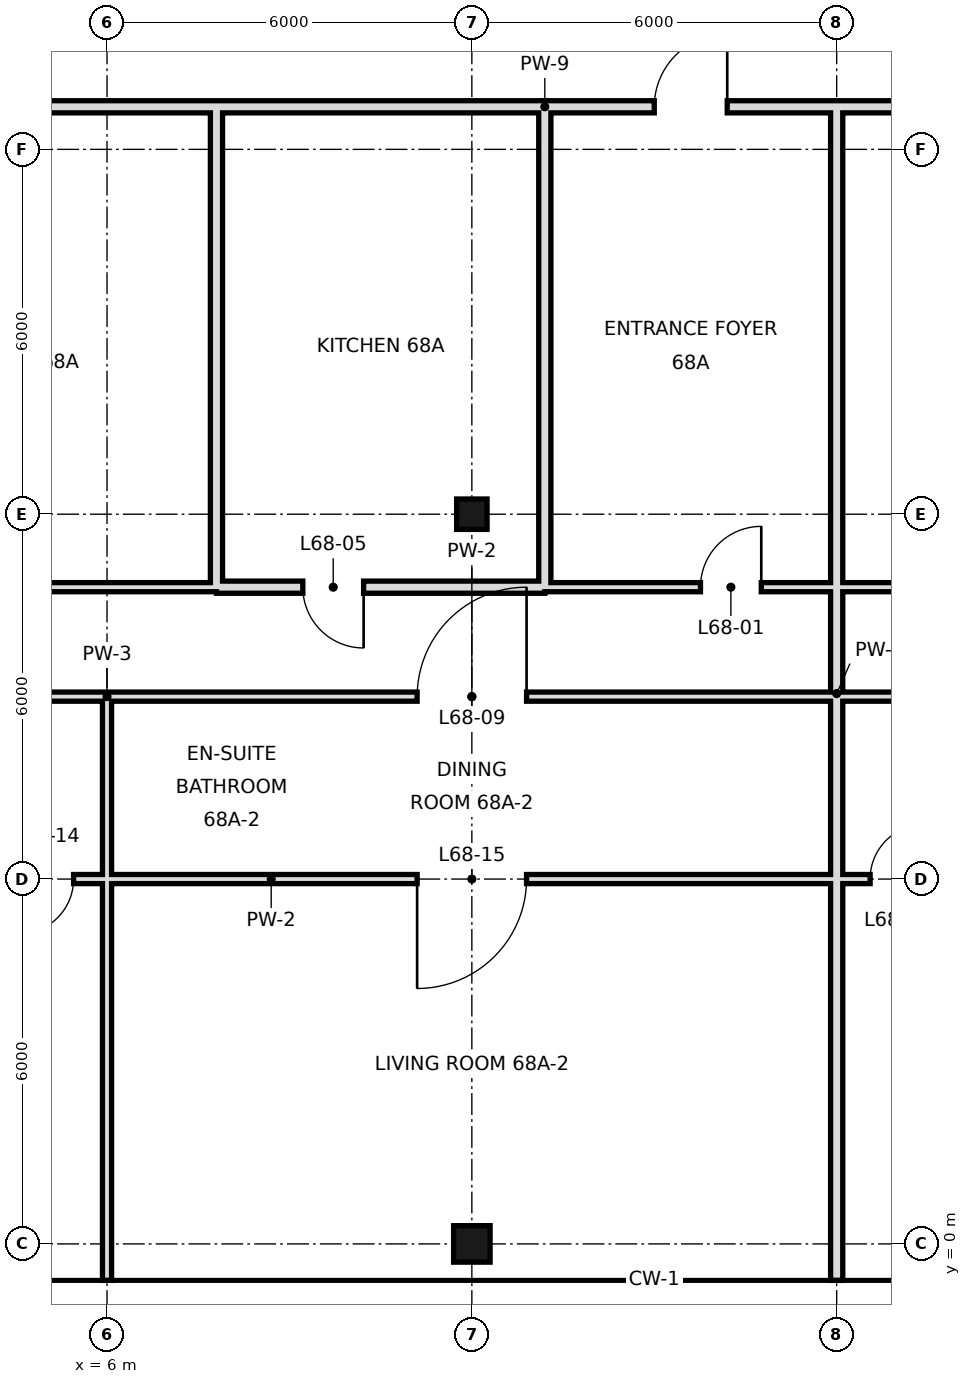
"""IFC4 building model, lengths in metres.
Left out: names, types, materials, properties, quantities, classifications, styles, units other than length and angle.
Written with IfcOpenShell. Run it as: python <this file> out.ifc"""

import sys

from ifc_helpers import new_model, si_unit, direction, frame, frame_2d, origin, origin_2d, place, context, subcontext, project, spatial, rectangle, hollow_rectangle, extrude, element, fill, save


model = new_model("IFC4")
c1 = context("Model", 3, precision=1e-05, world=origin(), true_north=direction((0.0, 1.0)))
c2 = subcontext(c1, "Body", "Model", "MODEL_VIEW")
j1 = project(units=[si_unit("LENGTHUNIT", "METRE"), si_unit("PLANEANGLEUNIT", "RADIAN")], contexts=[c1])
p1 = place(None, origin())
s1 = spatial("IfcSite", under=j1, at=p1, CompositionType="ELEMENT")
p2 = place(p1, origin())
s2 = spatial("IfcBuilding", under=s1, at=p2, CompositionType="ELEMENT")
p3 = place(p2, frame((0.0, 0.0, 290.8)))
s3 = spatial("IfcBuildingStorey", under=s2, at=p3, CompositionType="ELEMENT", Elevation=290.8)
p4 = place(p3, frame((12.0, 0.0, 0.0), z_axis=(0.0, 0.0, 1.0), x_axis=(1.0, 0.0, 0.0)))
e1 = element("IfcColumn", 1, at=p4, inside=s3, PredefinedType="COLUMN", context=c2, shape_type="SweptSolid", body=[
    extrude(hollow_rectangle(XDim=0.6, YDim=0.6, WallThickness=0.028, at=origin_2d()), origin(), (0.0, 0.0, 1.0), 3.6),
])
p5 = place(p3, frame((12.0, 12.0, 0.0), z_axis=(0.0, 0.0, 1.0), x_axis=(1.0, 0.0, 0.0)))
e2 = element("IfcColumn", 2, at=p5, inside=s3, PredefinedType="COLUMN", context=c2, shape_type="SweptSolid", body=[
    extrude(hollow_rectangle(XDim=0.5, YDim=0.5, WallThickness=0.025, at=origin_2d()), origin(), (0.0, 0.0, 1.0), 3.6),
])
p6 = place(p3, frame((13.2, 10.8, 0.0), z_axis=(0.0, 0.0, 1.0), x_axis=(0.0, 1.0, 0.0)))
e3 = element("IfcWall", 3, at=p6, inside=s3, PredefinedType="SOLIDWALL", context=c2, shape_type="SweptSolid", body=[
    extrude(rectangle(XDim=7.9, YDim=0.2, at=frame_2d((3.95, 0.0))), origin(), (0.0, 0.0, 1.0), 2.72),
])
p7 = place(p3, frame((18.0, -0.6, 0.0), z_axis=(0.0, 0.0, 1.0), x_axis=(0.0, 1.0, 0.0)))
e4 = element("IfcWall", 4, at=p7, inside=s3, PredefinedType="SOLIDWALL", context=c2, shape_type="SweptSolid", body=[
    extrude(rectangle(XDim=19.3, YDim=0.2, at=frame_2d((9.65, 0.0))), origin(), (0.0, 0.0, 1.0), 2.72),
])
p8 = place(p3, frame((6.0, -0.6, 0.0), z_axis=(0.0, 0.0, 1.0), x_axis=(0.0, 1.0, 0.0)))
e5 = element("IfcWall", 5, at=p8, inside=s3, PredefinedType="PARTITIONING", context=c2, shape_type="SweptSolid", body=[
    extrude(rectangle(XDim=6.6, YDim=0.15, at=frame_2d((3.3, 0.0))), origin(), (0.0, 0.0, 1.0), 2.72),
])
p9 = place(p3, frame((6.0, 6.0, 0.0), z_axis=(0.0, 0.0, 1.0), x_axis=(0.0, 1.0, 0.0)))
e6 = element("IfcWall", 6, at=p9, inside=s3, PredefinedType="PARTITIONING", context=c2, shape_type="SweptSolid", body=[
    extrude(rectangle(XDim=3.0, YDim=0.15, at=frame_2d((1.5, 0.0))), origin(), (0.0, 0.0, 1.0), 2.72),
])
p10 = place(p3, frame((7.8, 10.8, 0.0), z_axis=(0.0, 0.0, 1.0), x_axis=(0.0, 1.0, 0.0)))
e7 = element("IfcWall", 7, at=p10, inside=s3, PredefinedType="SOLIDWALL", context=c2, shape_type="SweptSolid", body=[
    extrude(rectangle(XDim=7.9, YDim=0.2, at=frame_2d((3.95, 0.0))), origin(), (0.0, 0.0, 1.0), 2.72),
])
p11 = place(p3, frame((7.8, 10.8, 0.0), z_axis=(0.0, 0.0, 1.0), x_axis=(1.0, 0.0, 0.0)))
e8 = element("IfcWall", 8, at=p11, inside=s3, PredefinedType="SOLIDWALL", context=c2, shape_type="SweptSolid", body=[
    extrude(rectangle(XDim=5.4, YDim=0.2, at=frame_2d((2.7, 0.0))), origin(), (0.0, 0.0, 1.0), 2.72),
])
p12 = place(p11, frame((1.42, 0.0, 0.0)))
e9 = element("IfcOpeningElement", 9, at=p12, cuts=e8, PredefinedType="OPENING", context=c2, shape_type="SweptSolid", body=[
    extrude(rectangle(XDim=1.0, YDim=2.4, at=frame_2d((0.5, 1.2))), frame((0.0, 0.11, 0.0), z_axis=(0.0, -1.0, 0.0), x_axis=(1.0, 0.0, 0.0)), (0.0, 0.0, 1.0), 0.22),
])
p13 = place(p3, frame((-15.6, 10.8, 0.0), z_axis=(0.0, 0.0, 1.0), x_axis=(1.0, 0.0, 0.0)))
e10 = element("IfcWall", 10, at=p13, inside=s3, PredefinedType="PARTITIONING", context=c2, shape_type="SweptSolid", body=[
    extrude(rectangle(XDim=23.4, YDim=0.15, at=frame_2d((11.7, 0.0))), origin(), (0.0, 0.0, 1.0), 3.42),
])
p14 = place(p13, frame((10.75, 0.0, 0.0)))
e11 = element("IfcOpeningElement", 11, at=p14, cuts=e10, PredefinedType="OPENING", context=c2, shape_type="SweptSolid", body=[
    extrude(rectangle(XDim=1.0, YDim=2.4, at=frame_2d((0.5, 1.2))), frame((0.0, 0.085, 0.0), z_axis=(0.0, -1.0, 0.0), x_axis=(1.0, 0.0, 0.0)), (0.0, 0.0, 1.0), 0.17),
])
p15 = place(p13, frame((17.2, 0.0, 0.0)))
e12 = element("IfcOpeningElement", 12, at=p15, cuts=e10, PredefinedType="OPENING", context=c2, shape_type="SweptSolid", body=[
    extrude(rectangle(XDim=1.0, YDim=2.4, at=frame_2d((0.5, 1.2))), frame((0.0, 0.085, 0.0), z_axis=(0.0, -1.0, 0.0), x_axis=(1.0, 0.0, 0.0)), (0.0, 0.0, 1.0), 0.17),
])
p16 = place(p3, frame((13.2, 10.8, 0.0), z_axis=(0.0, 0.0, 1.0), x_axis=(1.0, 0.0, 0.0)))
e13 = element("IfcWall", 13, at=p16, inside=s3, PredefinedType="PARTITIONING", context=c2, shape_type="SweptSolid", body=[
    extrude(rectangle(XDim=27.6, YDim=0.15, at=frame_2d((13.8, 0.0))), origin(), (0.0, 0.0, 1.0), 3.42),
])
p17 = place(p16, frame((2.56, 0.0, 0.0)))
e14 = element("IfcOpeningElement", 14, at=p17, cuts=e13, PredefinedType="OPENING", context=c2, shape_type="SweptSolid", body=[
    extrude(rectangle(XDim=1.0, YDim=2.4, at=frame_2d((0.5, 1.2))), frame((0.0, 0.085, 0.0), z_axis=(0.0, -1.0, 0.0), x_axis=(1.0, 0.0, 0.0)), (0.0, 0.0, 1.0), 0.17),
])
p18 = place(p16, frame((16.12, 0.0, 0.0)))
e15 = element("IfcOpeningElement", 15, at=p18, cuts=e13, PredefinedType="OPENING", context=c2, shape_type="SweptSolid", body=[
    extrude(rectangle(XDim=1.0, YDim=2.4, at=frame_2d((0.5, 1.2))), frame((0.0, 0.085, 0.0), z_axis=(0.0, -1.0, 0.0), x_axis=(1.0, 0.0, 0.0)), (0.0, 0.0, 1.0), 0.17),
])
p19 = place(p16, frame((9.1, 0.0, 0.0)))
e16 = element("IfcOpeningElement", 16, at=p19, cuts=e13, PredefinedType="OPENING", context=c2, shape_type="SweptSolid", body=[
    extrude(rectangle(XDim=1.0, YDim=2.4, at=frame_2d((0.5, 1.2))), frame((0.0, 0.085, 0.0), z_axis=(0.0, -1.0, 0.0), x_axis=(1.0, 0.0, 0.0)), (0.0, 0.0, 1.0), 0.17),
])
p20 = place(p16, frame((20.68, 0.0, 0.0)))
e17 = element("IfcOpeningElement", 17, at=p20, cuts=e13, PredefinedType="OPENING", context=c2, shape_type="SweptSolid", body=[
    extrude(rectangle(XDim=1.0, YDim=2.4, at=frame_2d((0.5, 1.2))), frame((0.0, 0.085, 0.0), z_axis=(0.0, -1.0, 0.0), x_axis=(1.0, 0.0, 0.0)), (0.0, 0.0, 1.0), 0.17),
])
p21 = place(p3, frame((3.1, 18.7, 0.0), z_axis=(0.0, 0.0, 1.0), x_axis=(1.0, 0.0, 0.0)))
e18 = element("IfcWall", 18, at=p21, inside=s3, PredefinedType="SOLIDWALL", context=c2, shape_type="SweptSolid", body=[
    extrude(rectangle(XDim=4.7, YDim=0.2, at=frame_2d((2.35, 0.0))), origin(), (0.0, 0.0, 1.0), 2.72),
])
p22 = place(p3, frame((13.2, 18.7, 0.0), z_axis=(0.0, 0.0, 1.0), x_axis=(1.0, 0.0, 0.0)))
e19 = element("IfcWall", 19, at=p22, inside=s3, PredefinedType="SOLIDWALL", context=c2, shape_type="SweptSolid", body=[
    extrude(rectangle(XDim=27.6, YDim=0.2, at=frame_2d((13.8, 0.0))), origin(), (0.0, 0.0, 1.0), 2.72),
])
p23 = place(p22, frame((1.8, 0.0, 0.0)))
e20 = element("IfcOpeningElement", 20, at=p23, cuts=e19, PredefinedType="OPENING", context=c2, shape_type="SweptSolid", body=[
    extrude(rectangle(XDim=1.2, YDim=2.4, at=frame_2d((0.6, 1.2))), frame((0.0, 0.11, 0.0), z_axis=(0.0, -1.0, 0.0), x_axis=(1.0, 0.0, 0.0)), (0.0, 0.0, 1.0), 0.22),
])
p24 = place(p22, frame((15.98, 0.0, 0.0)))
e21 = element("IfcOpeningElement", 21, at=p24, cuts=e19, PredefinedType="OPENING", context=c2, shape_type="SweptSolid", body=[
    extrude(rectangle(XDim=1.2, YDim=2.4, at=frame_2d((0.6, 1.2))), frame((0.0, 0.11, 0.0), z_axis=(0.0, -1.0, 0.0), x_axis=(1.0, 0.0, 0.0)), (0.0, 0.0, 1.0), 0.22),
])
p25 = place(p3, frame((7.8, 18.7, 0.0), z_axis=(0.0, 0.0, 1.0), x_axis=(1.0, 0.0, 0.0)))
e22 = element("IfcWall", 22, at=p25, inside=s3, PredefinedType="SOLIDWALL", context=c2, shape_type="SweptSolid", body=[
    extrude(rectangle(XDim=5.4, YDim=0.2, at=frame_2d((2.7, 0.0))), origin(), (0.0, 0.0, 1.0), 3.42),
])
p26 = place(p3, frame((6.0, 6.0, 0.0), z_axis=(0.0, 0.0, 1.0), x_axis=(1.0, 0.0, 0.0)))
e23 = element("IfcWall", 23, at=p26, inside=s3, PredefinedType="PARTITIONING", context=c2, shape_type="SweptSolid", body=[
    extrude(rectangle(XDim=12.0, YDim=0.15, at=frame_2d((6.0, 0.0))), origin(), (0.0, 0.0, 1.0), 2.97),
])
p27 = place(p26, frame((5.1, 0.0, 0.0)))
e24 = element("IfcOpeningElement", 24, at=p27, cuts=e23, PredefinedType="OPENING", context=c2, shape_type="SweptSolid", body=[
    extrude(rectangle(XDim=1.8, YDim=2.4, at=frame_2d((0.9, 1.2))), frame((0.0, 0.085, 0.0), z_axis=(0.0, -1.0, 0.0), x_axis=(1.0, 0.0, 0.0)), (0.0, 0.0, 1.0), 0.17),
])
p28 = place(p3, frame((3.6, 6.0, 0.0), z_axis=(0.0, 0.0, 1.0), x_axis=(1.0, 0.0, 0.0)))
e25 = element("IfcWall", 25, at=p28, inside=s3, PredefinedType="PARTITIONING", context=c2, shape_type="SweptSolid", body=[
    extrude(rectangle(XDim=2.4, YDim=0.15, at=frame_2d((1.2, 0.0))), origin(), (0.0, 0.0, 1.0), 2.97),
])
p29 = place(p28, frame((0.95, 0.0, 0.0)))
e26 = element("IfcOpeningElement", 26, at=p29, cuts=e25, PredefinedType="OPENING", context=c2, shape_type="SweptSolid", body=[
    extrude(rectangle(XDim=0.9, YDim=2.4, at=frame_2d((0.45, 1.2))), frame((0.0, 0.085, 0.0), z_axis=(0.0, -1.0, 0.0), x_axis=(1.0, 0.0, 0.0)), (0.0, 0.0, 1.0), 0.17),
])
p30 = place(p3, frame((18.0, 6.0, 0.0), z_axis=(0.0, 0.0, 1.0), x_axis=(1.0, 0.0, 0.0)))
e27 = element("IfcWall", 27, at=p30, inside=s3, PredefinedType="PARTITIONING", context=c2, shape_type="SweptSolid", body=[
    extrude(rectangle(XDim=2.4, YDim=0.15, at=frame_2d((1.2, 0.0))), origin(), (0.0, 0.0, 1.0), 2.97),
])
p31 = place(p30, frame((0.55, 0.0, 0.0)))
e28 = element("IfcOpeningElement", 28, at=p31, cuts=e27, PredefinedType="OPENING", context=c2, shape_type="SweptSolid", body=[
    extrude(rectangle(XDim=0.9, YDim=2.4, at=frame_2d((0.45, 1.2))), frame((0.0, 0.085, 0.0), z_axis=(0.0, -1.0, 0.0), x_axis=(1.0, 0.0, 0.0)), (0.0, 0.0, 1.0), 0.17),
])
p32 = place(p3, frame((6.0, 9.0, 0.0), z_axis=(0.0, 0.0, 1.0), x_axis=(1.0, 0.0, 0.0)))
e29 = element("IfcWall", 29, at=p32, inside=s3, PredefinedType="PARTITIONING", context=c2, shape_type="SweptSolid", body=[
    extrude(rectangle(XDim=12.0, YDim=0.15, at=frame_2d((6.0, 0.0))), origin(), (0.0, 0.0, 1.0), 3.42),
])
p33 = place(p32, frame((5.1, 0.0, 0.0)))
e30 = element("IfcOpeningElement", 30, at=p33, cuts=e29, PredefinedType="OPENING", context=c2, shape_type="SweptSolid", body=[
    extrude(rectangle(XDim=1.8, YDim=2.4, at=frame_2d((0.9, 1.2))), frame((0.0, 0.085, 0.0), z_axis=(0.0, -1.0, 0.0), x_axis=(1.0, 0.0, 0.0)), (0.0, 0.0, 1.0), 0.17),
])
for number, where, z_axis, x_axis in (
    (31, (3.6, 9.0, 0.0), (0.0, 0.0, 1.0), (1.0, 0.0, 0.0)),
    (32, (18.0, 9.0, 0.0), (0.0, 0.0, 1.0), (1.0, 0.0, 0.0)),
):
    element("IfcWall", number, at=place(p3, frame(where, z_axis=z_axis, x_axis=x_axis)), inside=s3, PredefinedType="PARTITIONING", context=c2, shape_type="SweptSolid", body=[
        extrude(rectangle(XDim=2.4, YDim=0.15, at=frame_2d((1.2, 0.0))), origin(), (0.0, 0.0, 1.0), 3.42),
    ])
p34 = place(p17, frame((1.0, 0.0, 0.0), z_axis=(0.0, 0.0, 1.0), x_axis=(-1.0, 0.0, 0.0)))
e33 = element("IfcDoor", 33, at=p34, inside=s3, OperationType="SINGLE_SWING_LEFT", PredefinedType="DOOR", context=c2, shape_type="SweptSolid", body=[
    extrude(rectangle(XDim=1.0, YDim=2.4, at=frame_2d((0.5, 1.2))), frame((0.0, 0.025, 0.0), z_axis=(0.0, -1.0, 0.0), x_axis=(1.0, 0.0, 0.0)), (0.0, 0.0, 1.0), 0.05),
])
fill(e14, e33)
p35 = place(p12, origin())
e34 = element("IfcDoor", 34, at=p35, inside=s3, OperationType="SINGLE_SWING_RIGHT", PredefinedType="DOOR", context=c2, shape_type="SweptSolid", body=[
    extrude(rectangle(XDim=1.0, YDim=2.4, at=frame_2d((0.5, 1.2))), frame((0.0, 0.025, 0.0), z_axis=(0.0, -1.0, 0.0), x_axis=(1.0, 0.0, 0.0)), (0.0, 0.0, 1.0), 0.05),
])
fill(e9, e34)
p36 = place(p33, frame((1.8, 0.0, 0.0), z_axis=(0.0, 0.0, 1.0), x_axis=(-1.0, 0.0, 0.0)))
e35 = element("IfcDoor", 35, at=p36, inside=s3, OperationType="SINGLE_SWING_LEFT", PredefinedType="DOOR", context=c2, shape_type="SweptSolid", body=[
    extrude(rectangle(XDim=1.8, YDim=2.4, at=frame_2d((0.9, 1.2))), frame((0.0, 0.025, 0.0), z_axis=(0.0, -1.0, 0.0), x_axis=(1.0, 0.0, 0.0)), (0.0, 0.0, 1.0), 0.05),
])
fill(e30, e35)
p37 = place(p29, frame((0.9, 0.0, 0.0), z_axis=(0.0, 0.0, 1.0), x_axis=(-1.0, 0.0, 0.0)))
e36 = element("IfcDoor", 36, at=p37, inside=s3, OperationType="SINGLE_SWING_RIGHT", PredefinedType="DOOR", context=c2, shape_type="SweptSolid", body=[
    extrude(rectangle(XDim=0.9, YDim=2.4, at=frame_2d((0.45, 1.2))), frame((0.0, 0.025, 0.0), z_axis=(0.0, -1.0, 0.0), x_axis=(1.0, 0.0, 0.0)), (0.0, 0.0, 1.0), 0.05),
])
fill(e26, e36)
p38 = place(p27, frame((1.8, 0.0, 0.0), z_axis=(0.0, 0.0, 1.0), x_axis=(-1.0, 0.0, 0.0)))
e37 = element("IfcDoor", 37, at=p38, inside=s3, OperationType="SINGLE_SWING_RIGHT", PredefinedType="DOOR", context=c2, shape_type="SweptSolid", body=[
    extrude(rectangle(XDim=1.8, YDim=2.4, at=frame_2d((0.9, 1.2))), frame((0.0, 0.025, 0.0), z_axis=(0.0, -1.0, 0.0), x_axis=(1.0, 0.0, 0.0)), (0.0, 0.0, 1.0), 0.05),
])
fill(e24, e37)
p39 = place(p31, frame((0.9, 0.0, 0.0), z_axis=(0.0, 0.0, 1.0), x_axis=(-1.0, 0.0, 0.0)))
e38 = element("IfcDoor", 38, at=p39, inside=s3, OperationType="SINGLE_SWING_LEFT", PredefinedType="DOOR", context=c2, shape_type="SweptSolid", body=[
    extrude(rectangle(XDim=0.9, YDim=2.4, at=frame_2d((0.45, 1.2))), frame((0.0, 0.025, 0.0), z_axis=(0.0, -1.0, 0.0), x_axis=(1.0, 0.0, 0.0)), (0.0, 0.0, 1.0), 0.05),
])
fill(e28, e38)
p40 = place(p23, frame((1.2, 0.0, 0.0), z_axis=(0.0, 0.0, 1.0), x_axis=(-1.0, 0.0, 0.0)))
e39 = element("IfcDoor", 39, at=p40, inside=s3, OperationType="SINGLE_SWING_LEFT", PredefinedType="DOOR", context=c2, shape_type="SweptSolid", body=[
    extrude(rectangle(XDim=1.2, YDim=2.4, at=frame_2d((0.6, 1.2))), frame((0.0, 0.025, 0.0), z_axis=(0.0, -1.0, 0.0), x_axis=(1.0, 0.0, 0.0)), (0.0, 0.0, 1.0), 0.05),
])
fill(e20, e39)
save(model, sys.argv[1])
